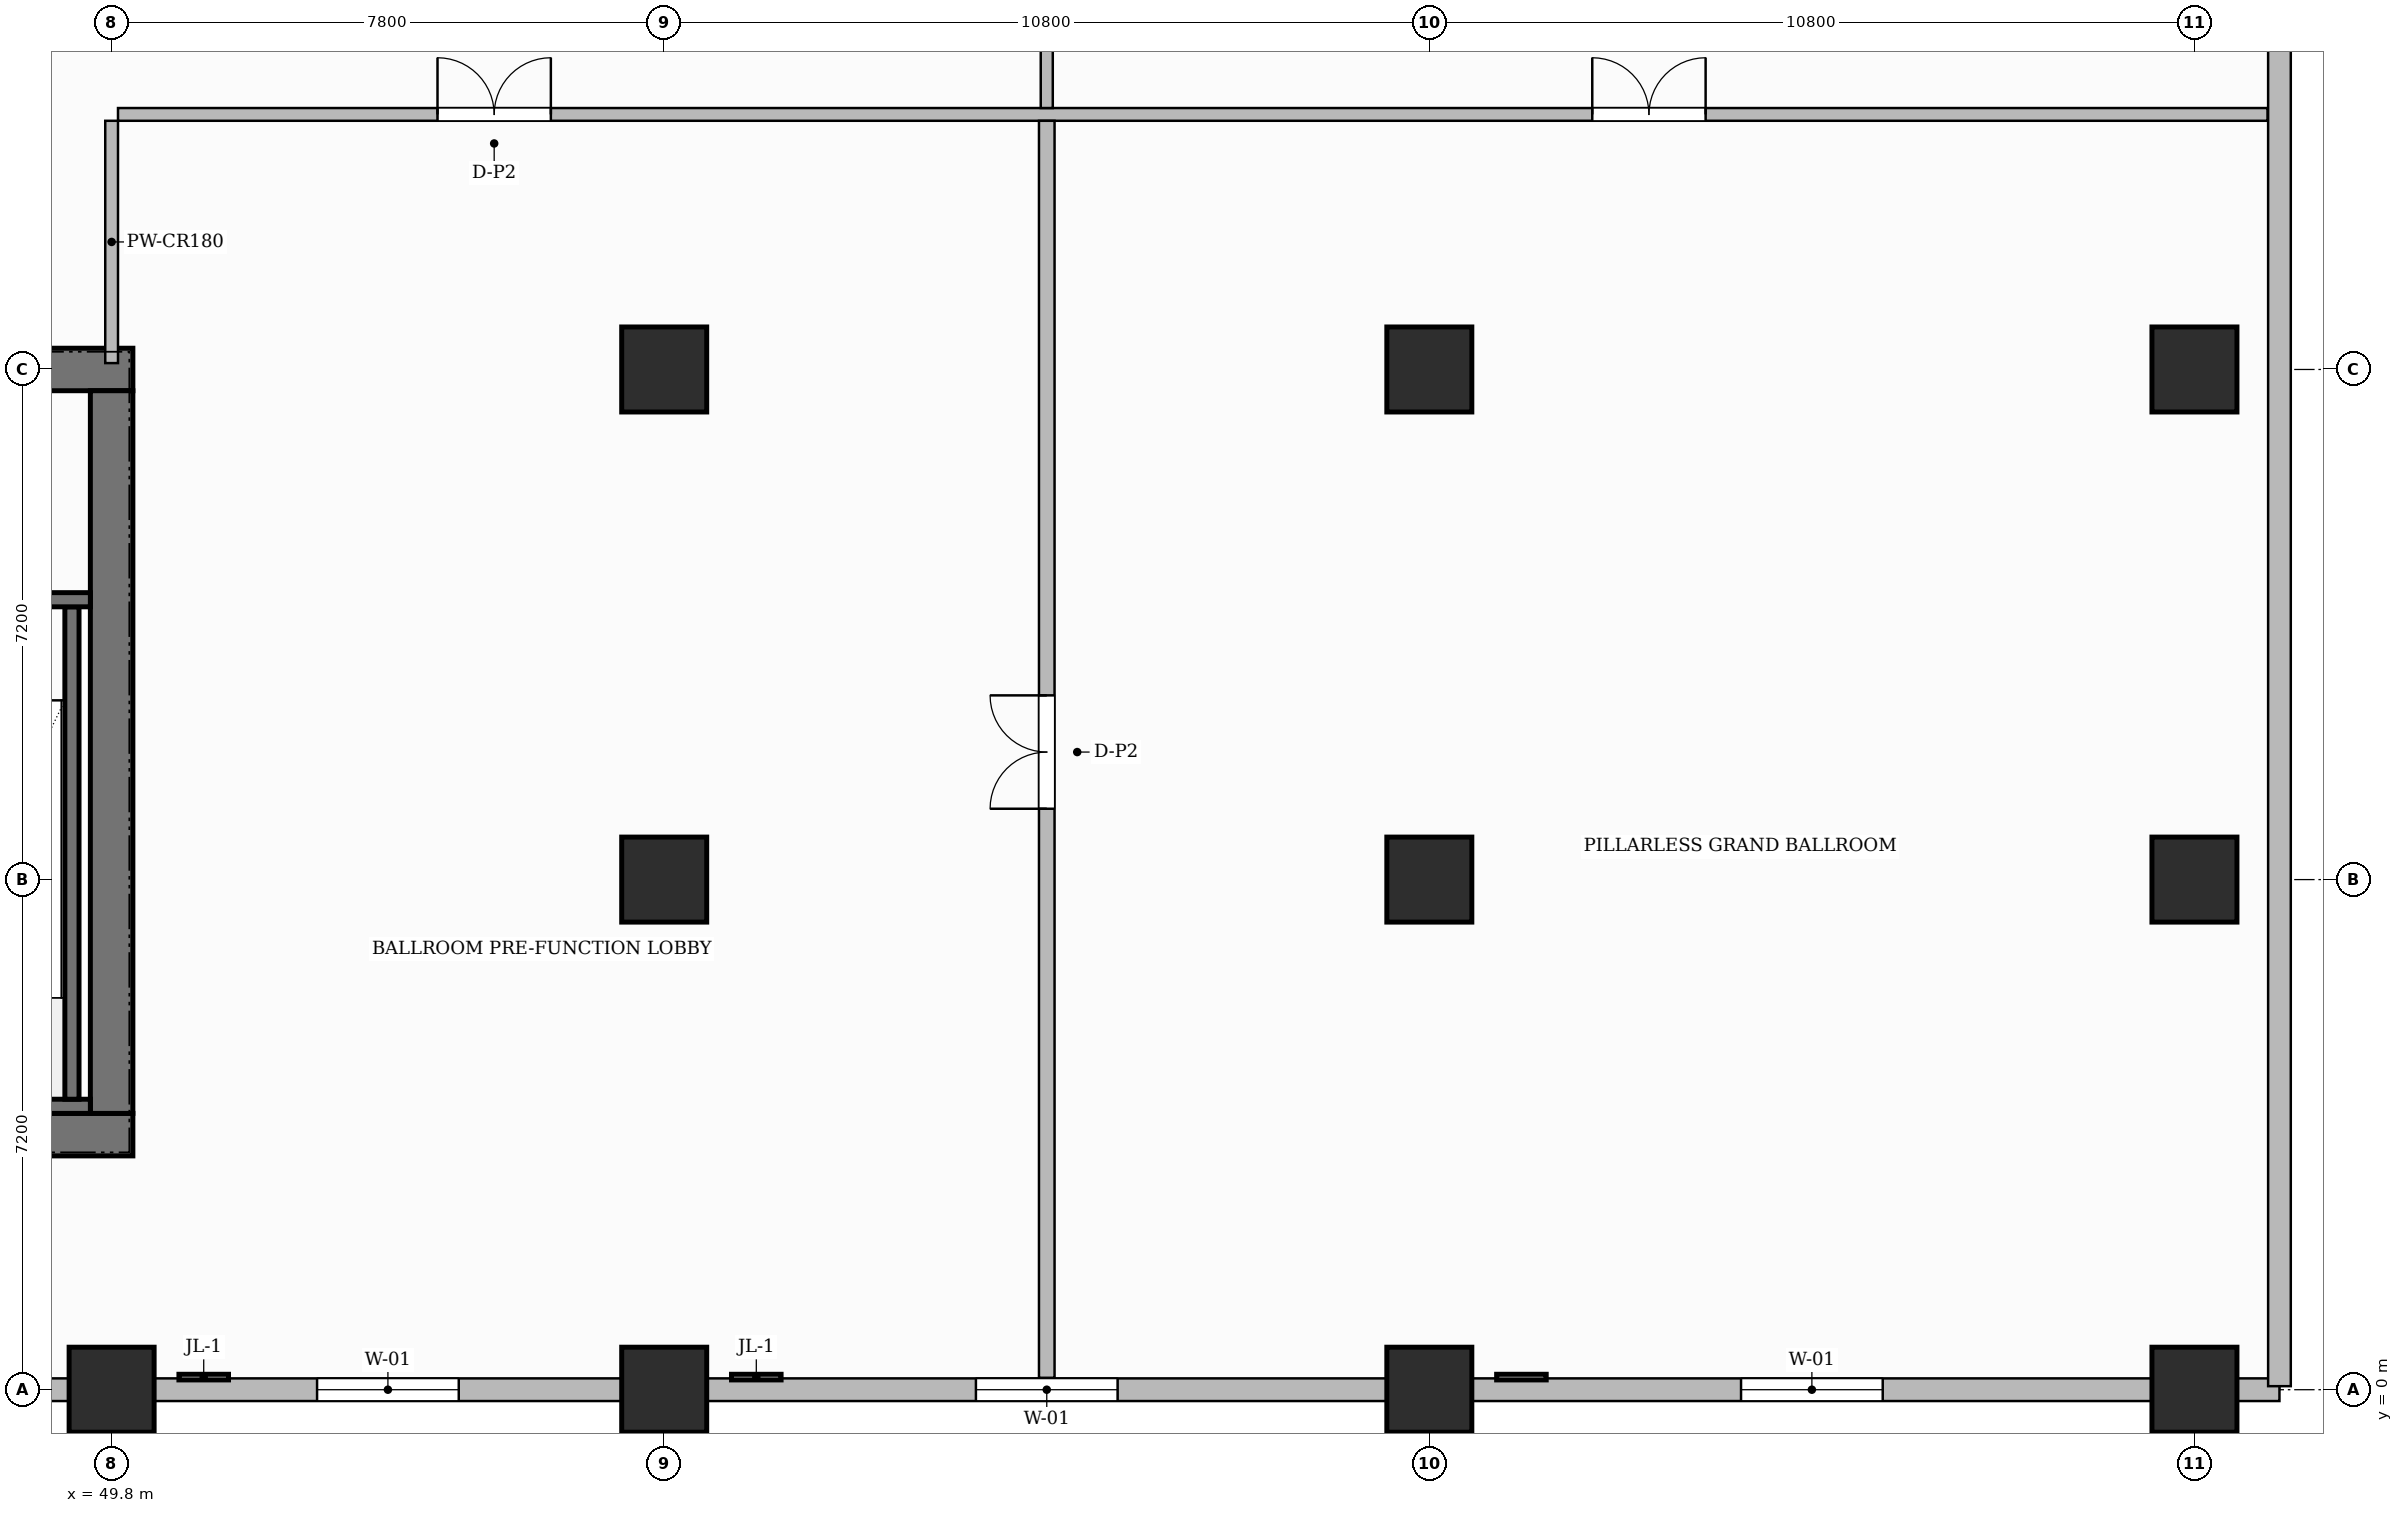
"""IFC4 building model, lengths in metres.
Left out: names, types, materials, properties, quantities, classifications, styles, units other than length and angle.
Written with IfcOpenShell. Run it as: python <this file> out.ifc"""

import sys

from ifc_helpers import new_model, si_unit, direction, frame, frame_2d, origin, origin_2d, place, context, subcontext, project, spatial, rectangle, extrude, source, transform, mapped, element, fill, save


model = new_model("IFC4")
c1 = context("Model", 3, precision=1e-05, world=origin(), true_north=direction((0.0, 1.0)))
c2 = subcontext(c1, "Body", "Model", "MODEL_VIEW")
j1 = project(units=[si_unit("LENGTHUNIT", "METRE"), si_unit("PLANEANGLEUNIT", "RADIAN")], contexts=[c1])
p1 = place(None, origin())
s1 = spatial("IfcSite", under=j1, at=p1, CompositionType="ELEMENT")
p2 = place(p1, origin())
s2 = spatial("IfcBuilding", under=s1, at=p2, CompositionType="ELEMENT")
p3 = place(p2, frame((0.0, 0.0, 21.6)))
s3 = spatial("IfcBuildingStorey", under=s2, at=p3, CompositionType="ELEMENT", Elevation=21.6)
p4 = place(p3, frame((34.5, 3.6, 0.0), z_axis=(0.0, 0.0, 1.0), x_axis=(1.0, 0.0, 0.0)))
e1 = element("IfcWall", 1, at=p4, inside=s3, PredefinedType="SHEAR", context=c2, shape_type="SweptSolid", body=[
    extrude(rectangle(XDim=15.6, YDim=0.6, at=frame_2d((7.8, 0.0))), origin(), (0.0, 0.0, 1.0), 5.4),
])
p5 = place(p4, frame((4.77, 0.0, 0.0)))
e2 = element("IfcOpeningElement", 2, at=p5, cuts=e1, PredefinedType="OPENING", context=c2, shape_type="SweptSolid", body=[
    extrude(rectangle(XDim=0.9, YDim=2.1, at=frame_2d((0.45, 1.05))), frame((0.0, 0.31, 0.0), z_axis=(0.0, -1.0, 0.0), x_axis=(1.0, 0.0, 0.0)), (0.0, 0.0, 1.0), 0.62),
])
p6 = place(p4, frame((7.15, 0.0, 0.0)))
e3 = element("IfcOpeningElement", 3, at=p6, cuts=e1, PredefinedType="OPENING", context=c2, shape_type="SweptSolid", body=[
    extrude(rectangle(XDim=0.9, YDim=2.1, at=frame_2d((0.45, 1.05))), frame((0.0, 0.31, 0.0), z_axis=(0.0, -1.0, 0.0), x_axis=(1.0, 0.0, 0.0)), (0.0, 0.0, 1.0), 0.62),
])
p7 = place(p3, frame((34.5, 14.4, 0.0), z_axis=(0.0, 0.0, 1.0), x_axis=(1.0, 0.0, 0.0)))
e4 = element("IfcWall", 4, at=p7, inside=s3, PredefinedType="SHEAR", context=c2, shape_type="SweptSolid", body=[
    extrude(rectangle(XDim=15.6, YDim=0.6, at=frame_2d((7.8, 0.0))), origin(), (0.0, 0.0, 1.0), 5.4),
])
p8 = place(p7, frame((5.43, 0.0, 0.0)))
e5 = element("IfcOpeningElement", 5, at=p8, cuts=e4, PredefinedType="OPENING", context=c2, shape_type="SweptSolid", body=[
    extrude(rectangle(XDim=1.5, YDim=2.2, at=frame_2d((0.75, 1.1))), frame((0.0, 0.31, 0.0), z_axis=(0.0, -1.0, 0.0), x_axis=(1.0, 0.0, 0.0)), (0.0, 0.0, 1.0), 0.62),
])
p9 = place(p7, frame((1.645, 0.0, 0.0)))
e6 = element("IfcOpeningElement", 6, at=p9, cuts=e4, PredefinedType="OPENING", context=c2, shape_type="SweptSolid", body=[
    extrude(rectangle(XDim=1.05, YDim=2.15, at=frame_2d((0.525, 1.075))), frame((0.0, 0.31, 0.0), z_axis=(0.0, -1.0, 0.0), x_axis=(1.0, 0.0, 0.0)), (0.0, 0.0, 1.0), 0.62),
])
p10 = place(p7, frame((11.275, 0.0, 0.0)))
e7 = element("IfcOpeningElement", 7, at=p10, cuts=e4, PredefinedType="OPENING", context=c2, shape_type="SweptSolid", body=[
    extrude(rectangle(XDim=1.05, YDim=2.15, at=frame_2d((0.525, 1.075))), frame((0.0, 0.31, 0.0), z_axis=(0.0, -1.0, 0.0), x_axis=(1.0, 0.0, 0.0)), (0.0, 0.0, 1.0), 0.62),
])
p11 = place(p3, frame((49.8, 3.9, 0.0), z_axis=(0.0, 0.0, 1.0), x_axis=(0.0, 1.0, 0.0)))
e8 = element("IfcWall", 8, at=p11, inside=s3, PredefinedType="SHEAR", context=c2, shape_type="SweptSolid", body=[
    extrude(rectangle(XDim=10.2, YDim=0.6, at=frame_2d((5.1, 0.0))), origin(), (0.0, 0.0, 1.0), 5.4),
])
m1 = source(origin(), c2, "Body", "SweptSolid", [
    extrude(rectangle(XDim=1.2, YDim=1.2, at=origin_2d()), origin(), (0.0, 0.0, 1.0), 5.4),
])
for number, where, z_axis, x_axis in (
    (9, (49.8, 0.0, 0.0), (0.0, 0.0, 1.0), (1.0, 0.0, 0.0)),
    (10, (57.6, 0.0, 0.0), (0.0, 0.0, 1.0), (1.0, 0.0, 0.0)),
    (11, (57.6, 7.2, 0.0), (0.0, 0.0, 1.0), (1.0, 0.0, 0.0)),
    (12, (57.6, 14.4, 0.0), (0.0, 0.0, 1.0), (1.0, 0.0, 0.0)),
    (13, (68.4, 0.0, 0.0), (0.0, 0.0, 1.0), (1.0, 0.0, 0.0)),
    (14, (68.4, 7.2, 0.0), (0.0, 0.0, 1.0), (1.0, 0.0, 0.0)),
    (15, (68.4, 14.4, 0.0), (0.0, 0.0, 1.0), (1.0, 0.0, 0.0)),
    (16, (79.2, 0.0, 0.0), (0.0, 0.0, 1.0), (1.0, 0.0, 0.0)),
    (17, (79.2, 7.2, 0.0), (0.0, 0.0, 1.0), (1.0, 0.0, 0.0)),
    (18, (79.2, 14.4, 0.0), (0.0, 0.0, 1.0), (1.0, 0.0, 0.0)),
):
    element("IfcColumn", number, at=place(p3, frame(where, z_axis=z_axis, x_axis=x_axis)), inside=s3, PredefinedType="COLUMN", context=c2, shape_type="MappedRepresentation", body=[
        mapped(m1, transform((0.0, 0.0, 0.0), scale=1.0)),
    ])
p12 = place(p3, frame((43.12, 4.0, 0.0), z_axis=(0.0, 0.0, 1.0), x_axis=(1.0, 0.0, 0.0)))
e19 = element("IfcWall", 19, at=p12, inside=s3, PredefinedType="SHEAR", context=c2, shape_type="SweptSolid", body=[
    extrude(rectangle(XDim=6.38, YDim=0.2, at=frame_2d((3.19, 0.0))), origin(), (0.0, 0.0, 1.0), 5.4),
])
p13 = place(p3, frame((49.24, 4.1, 0.0), z_axis=(0.0, 0.0, 1.0), x_axis=(0.0, 1.0, 0.0)))
e20 = element("IfcWall", 20, at=p13, inside=s3, PredefinedType="SHEAR", context=c2, shape_type="SweptSolid", body=[
    extrude(rectangle(XDim=6.95, YDim=0.2, at=frame_2d((3.475, 0.0))), origin(), (0.0, 0.0, 1.0), 5.4),
])
p14 = place(p3, frame((43.12, 11.15, 0.0), z_axis=(0.0, 0.0, 1.0), x_axis=(1.0, 0.0, 0.0)))
e21 = element("IfcWall", 21, at=p14, inside=s3, PredefinedType="SHEAR", context=c2, shape_type="SweptSolid", body=[
    extrude(rectangle(XDim=6.38, YDim=0.2, at=frame_2d((3.19, 0.0))), origin(), (0.0, 0.0, 1.0), 5.4),
])
p15 = place(p14, frame((1.045, 0.0, 0.0)))
e22 = element("IfcOpeningElement", 22, at=p15, cuts=e21, PredefinedType="OPENING", context=c2, shape_type="SweptSolid", body=[
    extrude(rectangle(XDim=1.05, YDim=2.2, at=frame_2d((0.525, 1.1))), frame((0.0, 0.11, 0.0), z_axis=(0.0, -1.0, 0.0), x_axis=(1.0, 0.0, 0.0)), (0.0, 0.0, 1.0), 0.22),
])
p16 = place(p14, frame((4.125, 0.0, 0.0)))
e23 = element("IfcOpeningElement", 23, at=p16, cuts=e21, PredefinedType="OPENING", context=c2, shape_type="SweptSolid", body=[
    extrude(rectangle(XDim=1.05, YDim=2.2, at=frame_2d((0.525, 1.1))), frame((0.0, 0.11, 0.0), z_axis=(0.0, -1.0, 0.0), x_axis=(1.0, 0.0, 0.0)), (0.0, 0.0, 1.0), 0.22),
])
p17 = place(p3, frame((49.8, 14.49, 0.0), z_axis=(0.0, 0.0, 1.0), x_axis=(0.0, 1.0, 0.0)))
e24 = element("IfcWall", 24, at=p17, inside=s3, PredefinedType="PARTITIONING", context=c2, shape_type="SweptSolid", body=[
    extrude(rectangle(XDim=3.42, YDim=0.18, at=frame_2d((1.71, 0.0))), origin(), (0.0, 0.0, 1.0), 4.085),
])
p18 = place(p3, frame((49.89, 18.0, 0.0), z_axis=(0.0, 0.0, 1.0), x_axis=(1.0, 0.0, 0.0)))
e25 = element("IfcWall", 25, at=p18, inside=s3, PredefinedType="PARTITIONING", context=c2, shape_type="SweptSolid", body=[
    extrude(rectangle(XDim=30.342, YDim=0.18, at=frame_2d((15.171, 0.0))), origin(), (0.0, 0.0, 1.0), 5.1),
])
p19 = place(p18, frame((4.51, 0.0, 0.0)))
e26 = element("IfcOpeningElement", 26, at=p19, cuts=e25, PredefinedType="OPENING", context=c2, shape_type="SweptSolid", body=[
    extrude(rectangle(XDim=1.6, YDim=2.4, at=frame_2d((0.8, 1.2))), frame((0.0, 0.1, 0.0), z_axis=(0.0, -1.0, 0.0), x_axis=(1.0, 0.0, 0.0)), (0.0, 0.0, 1.0), 0.2),
])
p20 = place(p18, frame((20.81, 0.0, 0.0)))
e27 = element("IfcOpeningElement", 27, at=p20, cuts=e25, PredefinedType="OPENING", context=c2, shape_type="SweptSolid", body=[
    extrude(rectangle(XDim=1.6, YDim=2.4, at=frame_2d((0.8, 1.2))), frame((0.0, 0.1, 0.0), z_axis=(0.0, -1.0, 0.0), x_axis=(1.0, 0.0, 0.0)), (0.0, 0.0, 1.0), 0.2),
])
p21 = place(p3, frame((63.0, 0.168, 0.0), z_axis=(0.0, 0.0, 1.0), x_axis=(0.0, 1.0, 0.0)))
e28 = element("IfcWall", 28, at=p21, inside=s3, PredefinedType="PARTITIONING", context=c2, shape_type="SweptSolid", body=[
    extrude(rectangle(XDim=17.742, YDim=0.22, at=frame_2d((8.871, 0.0))), origin(), (0.0, 0.0, 1.0), 5.1),
])
p22 = place(p21, frame((8.032, 0.0, 0.0)))
e29 = element("IfcOpeningElement", 29, at=p22, cuts=e28, PredefinedType="OPENING", context=c2, shape_type="SweptSolid", body=[
    extrude(rectangle(XDim=1.6, YDim=2.4, at=frame_2d((0.8, 1.2))), frame((0.0, 0.12, 0.0), z_axis=(0.0, -1.0, 0.0), x_axis=(1.0, 0.0, 0.0)), (0.0, 0.0, 1.0), 0.24),
])
p23 = place(p3, frame((63.0, 18.09, 0.0), z_axis=(0.0, 0.0, 1.0), x_axis=(0.0, 1.0, 0.0)))
e30 = element("IfcWall", 30, at=p23, inside=s3, PredefinedType="PARTITIONING", context=c2, shape_type="SweptSolid", body=[
    extrude(rectangle(XDim=12.42, YDim=0.17, at=frame_2d((6.21, 0.0))), origin(), (0.0, 0.0, 1.0), 5.1),
])
p24 = place(p23, frame((5.41, 0.0, 0.0)))
e31 = element("IfcOpeningElement", 31, at=p24, cuts=e30, PredefinedType="OPENING", context=c2, shape_type="SweptSolid", body=[
    extrude(rectangle(XDim=1.6, YDim=2.4, at=frame_2d((0.8, 1.2))), frame((0.0, 0.095, 0.0), z_axis=(0.0, -1.0, 0.0), x_axis=(1.0, 0.0, 0.0)), (0.0, 0.0, 1.0), 0.19),
])
p25 = place(p3, frame((-4.8, 0.0, 0.0), z_axis=(0.0, 0.0, 1.0), x_axis=(1.0, 0.0, 0.0)))
e32 = element("IfcWall", 32, at=p25, inside=s3, PredefinedType="SOLIDWALL", context=c2, shape_type="SweptSolid", body=[
    extrude(rectangle(XDim=85.2, YDim=0.32, at=frame_2d((42.6, 0.0))), origin(), (0.0, 0.0, 1.0), 4.085),
])
p26 = place(p25, frame((1.4, 0.0, 0.75)))
e33 = element("IfcOpeningElement", 33, at=p26, cuts=e32, PredefinedType="OPENING", context=c2, shape_type="SweptSolid", body=[
    extrude(rectangle(XDim=2.0, YDim=2.6, at=frame_2d((1.0, 1.3))), frame((0.0, 0.17, 0.0), z_axis=(0.0, -1.0, 0.0), x_axis=(1.0, 0.0, 0.0)), (0.0, 0.0, 1.0), 0.34),
])
p27 = place(p25, frame((7.4, 0.0, 0.75)))
e34 = element("IfcOpeningElement", 34, at=p27, cuts=e32, PredefinedType="OPENING", context=c2, shape_type="SweptSolid", body=[
    extrude(rectangle(XDim=2.0, YDim=2.6, at=frame_2d((1.0, 1.3))), frame((0.0, 0.17, 0.0), z_axis=(0.0, -1.0, 0.0), x_axis=(1.0, 0.0, 0.0)), (0.0, 0.0, 1.0), 0.34),
])
p28 = place(p25, frame((14.6, 0.0, 0.75)))
e35 = element("IfcOpeningElement", 35, at=p28, cuts=e32, PredefinedType="OPENING", context=c2, shape_type="SweptSolid", body=[
    extrude(rectangle(XDim=2.0, YDim=2.6, at=frame_2d((1.0, 1.3))), frame((0.0, 0.17, 0.0), z_axis=(0.0, -1.0, 0.0), x_axis=(1.0, 0.0, 0.0)), (0.0, 0.0, 1.0), 0.34),
])
p29 = place(p25, frame((21.8, 0.0, 0.75)))
e36 = element("IfcOpeningElement", 36, at=p29, cuts=e32, PredefinedType="OPENING", context=c2, shape_type="SweptSolid", body=[
    extrude(rectangle(XDim=2.0, YDim=2.6, at=frame_2d((1.0, 1.3))), frame((0.0, 0.17, 0.0), z_axis=(0.0, -1.0, 0.0), x_axis=(1.0, 0.0, 0.0)), (0.0, 0.0, 1.0), 0.34),
])
p30 = place(p25, frame((29.0, 0.0, 0.75)))
e37 = element("IfcOpeningElement", 37, at=p30, cuts=e32, PredefinedType="OPENING", context=c2, shape_type="SweptSolid", body=[
    extrude(rectangle(XDim=2.0, YDim=2.6, at=frame_2d((1.0, 1.3))), frame((0.0, 0.17, 0.0), z_axis=(0.0, -1.0, 0.0), x_axis=(1.0, 0.0, 0.0)), (0.0, 0.0, 1.0), 0.34),
])
p31 = place(p25, frame((35.6, 0.0, 0.75)))
e38 = element("IfcOpeningElement", 38, at=p31, cuts=e32, PredefinedType="OPENING", context=c2, shape_type="SweptSolid", body=[
    extrude(rectangle(XDim=2.0, YDim=2.6, at=frame_2d((1.0, 1.3))), frame((0.0, 0.17, 0.0), z_axis=(0.0, -1.0, 0.0), x_axis=(1.0, 0.0, 0.0)), (0.0, 0.0, 1.0), 0.34),
])
p32 = place(p25, frame((42.2, 0.0, 0.75)))
e39 = element("IfcOpeningElement", 39, at=p32, cuts=e32, PredefinedType="OPENING", context=c2, shape_type="SweptSolid", body=[
    extrude(rectangle(XDim=2.0, YDim=2.6, at=frame_2d((1.0, 1.3))), frame((0.0, 0.17, 0.0), z_axis=(0.0, -1.0, 0.0), x_axis=(1.0, 0.0, 0.0)), (0.0, 0.0, 1.0), 0.34),
])
p33 = place(p25, frame((49.7, 0.0, 0.75)))
e40 = element("IfcOpeningElement", 40, at=p33, cuts=e32, PredefinedType="OPENING", context=c2, shape_type="SweptSolid", body=[
    extrude(rectangle(XDim=2.0, YDim=2.6, at=frame_2d((1.0, 1.3))), frame((0.0, 0.17, 0.0), z_axis=(0.0, -1.0, 0.0), x_axis=(1.0, 0.0, 0.0)), (0.0, 0.0, 1.0), 0.34),
])
p34 = place(p25, frame((57.5, 0.0, 0.75)))
e41 = element("IfcOpeningElement", 41, at=p34, cuts=e32, PredefinedType="OPENING", context=c2, shape_type="SweptSolid", body=[
    extrude(rectangle(XDim=2.0, YDim=2.6, at=frame_2d((1.0, 1.3))), frame((0.0, 0.17, 0.0), z_axis=(0.0, -1.0, 0.0), x_axis=(1.0, 0.0, 0.0)), (0.0, 0.0, 1.0), 0.34),
])
p35 = place(p25, frame((66.8, 0.0, 0.75)))
e42 = element("IfcOpeningElement", 42, at=p35, cuts=e32, PredefinedType="OPENING", context=c2, shape_type="SweptSolid", body=[
    extrude(rectangle(XDim=2.0, YDim=2.6, at=frame_2d((1.0, 1.3))), frame((0.0, 0.17, 0.0), z_axis=(0.0, -1.0, 0.0), x_axis=(1.0, 0.0, 0.0)), (0.0, 0.0, 1.0), 0.34),
])
p36 = place(p25, frame((77.6, 0.0, 0.75)))
e43 = element("IfcOpeningElement", 43, at=p36, cuts=e32, PredefinedType="OPENING", context=c2, shape_type="SweptSolid", body=[
    extrude(rectangle(XDim=2.0, YDim=2.6, at=frame_2d((1.0, 1.3))), frame((0.0, 0.17, 0.0), z_axis=(0.0, -1.0, 0.0), x_axis=(1.0, 0.0, 0.0)), (0.0, 0.0, 1.0), 0.34),
])
p37 = place(p3, frame((80.4, 0.05, 0.0), z_axis=(0.0, 0.0, 1.0), x_axis=(0.0, 1.0, 0.0)))
e44 = element("IfcWall", 44, at=p37, inside=s3, PredefinedType="SOLIDWALL", context=c2, shape_type="SweptSolid", body=[
    extrude(rectangle(XDim=46.7, YDim=0.32, at=frame_2d((23.35, 0.0))), origin(), (0.0, 0.0, 1.0), 5.1),
])
p38 = place(p37, frame((22.35, 0.0, 0.75)))
e45 = element("IfcOpeningElement", 45, at=p38, cuts=e44, PredefinedType="OPENING", context=c2, shape_type="SweptSolid", body=[
    extrude(rectangle(XDim=2.0, YDim=2.6, at=frame_2d((1.0, 1.3))), frame((0.0, 0.17, 0.0), z_axis=(0.0, -1.0, 0.0), x_axis=(1.0, 0.0, 0.0)), (0.0, 0.0, 1.0), 0.34),
])
m2 = source(origin(), c2, "Body", "SweptSolid", [
    extrude(rectangle(XDim=1.6, YDim=2.4, at=frame_2d((0.8, 1.2))), frame((0.0, 0.025, 0.0), z_axis=(0.0, -1.0, 0.0), x_axis=(1.0, 0.0, 0.0)), (0.0, 0.0, 1.0), 0.05),
])
p39 = place(p22, origin())
e46 = element("IfcDoor", 46, at=p39, inside=s3, OperationType="DOUBLE_DOOR_SINGLE_SWING", PredefinedType="DOOR", context=c2, shape_type="MappedRepresentation", body=[
    mapped(m2, transform((0.0, 0.0, 0.0), scale=1.0)),
])
fill(e29, e46)
p40 = place(p19, origin())
e47 = element("IfcDoor", 47, at=p40, inside=s3, OperationType="DOUBLE_DOOR_SINGLE_SWING", PredefinedType="DOOR", context=c2, shape_type="MappedRepresentation", body=[
    mapped(m2, transform((0.0, 0.0, 0.0), scale=1.0)),
])
fill(e26, e47)
p41 = place(p20, origin())
e48 = element("IfcDoor", 48, at=p41, inside=s3, OperationType="DOUBLE_DOOR_SINGLE_SWING", PredefinedType="DOOR", context=c2, shape_type="MappedRepresentation", body=[
    mapped(m2, transform((0.0, 0.0, 0.0), scale=1.0)),
])
fill(e27, e48)
m3 = source(origin(), c2, "Body", "SweptSolid", [
    extrude(rectangle(XDim=2.0, YDim=2.6, at=frame_2d((1.0, 1.3))), frame((0.0, 0.03, 0.0), z_axis=(0.0, -1.0, 0.0), x_axis=(1.0, 0.0, 0.0)), (0.0, 0.0, 1.0), 0.06),
])
p42 = place(p34, origin())
e49 = element("IfcWindow", 49, at=p42, inside=s3, PartitioningType="DOUBLE_PANEL_VERTICAL", PredefinedType="WINDOW", context=c2, shape_type="MappedRepresentation", body=[
    mapped(m3, transform((0.0, 0.0, 0.0), scale=1.0)),
])
fill(e41, e49)
p43 = place(p35, origin())
e50 = element("IfcWindow", 50, at=p43, inside=s3, PartitioningType="DOUBLE_PANEL_VERTICAL", PredefinedType="WINDOW", context=c2, shape_type="MappedRepresentation", body=[
    mapped(m3, transform((0.0, 0.0, 0.0), scale=1.0)),
])
fill(e42, e50)
p44 = place(p36, origin())
e51 = element("IfcWindow", 51, at=p44, inside=s3, PartitioningType="DOUBLE_PANEL_VERTICAL", PredefinedType="WINDOW", context=c2, shape_type="MappedRepresentation", body=[
    mapped(m3, transform((0.0, 0.0, 0.0), scale=1.0)),
])
fill(e43, e51)
save(model, sys.argv[1])
